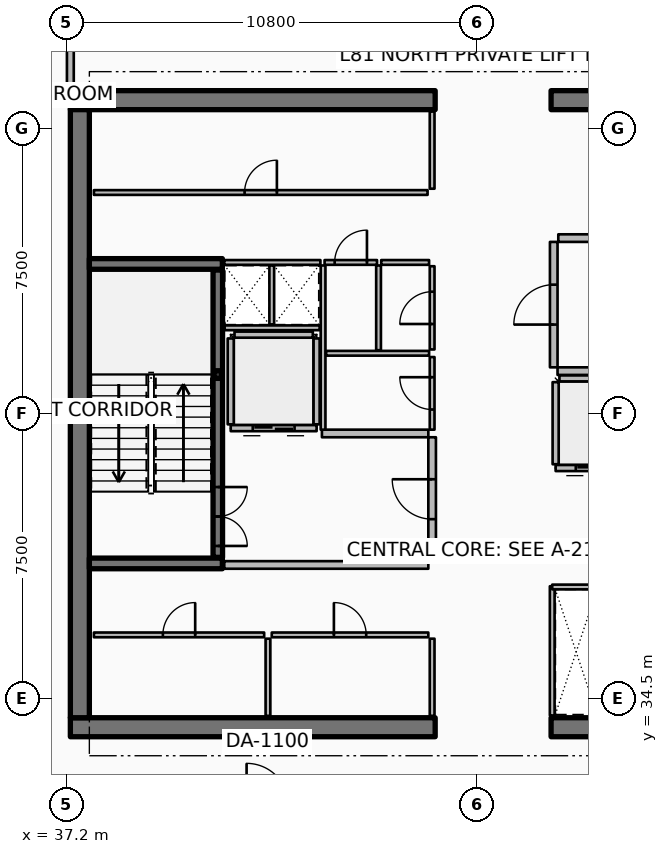
"""IFC4 building model, lengths in metres.
Left out: names, types, materials, properties, quantities, classifications, styles, units other than length and angle.
Written with IfcOpenShell. Run it as: python <this file> out.ifc"""

import sys

from ifc_helpers import new_model, si_unit, direction, frame, frame_2d, origin, origin_2d, place, context, subcontext, project, spatial, rectangle, hollow_rectangle, extrude, element, fill, save


model = new_model("IFC4")
c1 = context("Model", 3, precision=1e-05, world=origin(), true_north=direction((0.0, 1.0)))
c2 = subcontext(c1, "Body", "Model", "MODEL_VIEW")
j1 = project(units=[si_unit("LENGTHUNIT", "METRE"), si_unit("PLANEANGLEUNIT", "RADIAN")], contexts=[c1])
p1 = place(None, origin())
s1 = spatial("IfcSite", under=j1, at=p1, CompositionType="ELEMENT")
p2 = place(p1, origin())
s2 = spatial("IfcBuilding", under=s1, at=p2, CompositionType="ELEMENT")
p3 = place(p2, frame((0.0, 0.0, 322.1)))
s3 = spatial("IfcBuildingStorey", under=s2, at=p3, CompositionType="ELEMENT", Elevation=322.1)
p4 = place(p3, frame((37.3, 33.75, 0.0), z_axis=(0.0, 0.0, 1.0), x_axis=(1.0, 0.0, 0.0)))
e1 = element("IfcWall", 1, at=p4, inside=s3, PredefinedType="SHEAR", context=c2, shape_type="SweptSolid", body=[
    extrude(rectangle(XDim=9.6, YDim=0.5, at=frame_2d((4.8, 0.0))), origin(), (0.0, 0.0, 1.0), 4.2),
])
p5 = place(p3, frame((49.95, 33.75, 0.0), z_axis=(0.0, 0.0, 1.0), x_axis=(1.0, 0.0, 0.0)))
e2 = element("IfcWall", 2, at=p5, inside=s3, PredefinedType="SHEAR", context=c2, shape_type="SweptSolid", body=[
    extrude(rectangle(XDim=9.6, YDim=0.5, at=frame_2d((4.8, 0.0))), origin(), (0.0, 0.0, 1.0), 4.2),
])
p6 = place(p3, frame((37.3, 50.25, 0.0), z_axis=(0.0, 0.0, 1.0), x_axis=(1.0, 0.0, 0.0)))
e3 = element("IfcWall", 3, at=p6, inside=s3, PredefinedType="SHEAR", context=c2, shape_type="SweptSolid", body=[
    extrude(rectangle(XDim=9.6, YDim=0.5, at=frame_2d((4.8, 0.0))), origin(), (0.0, 0.0, 1.0), 4.2),
])
p7 = place(p3, frame((49.95, 50.25, 0.0), z_axis=(0.0, 0.0, 1.0), x_axis=(1.0, 0.0, 0.0)))
e4 = element("IfcWall", 4, at=p7, inside=s3, PredefinedType="SHEAR", context=c2, shape_type="SweptSolid", body=[
    extrude(rectangle(XDim=9.6, YDim=0.5, at=frame_2d((4.8, 0.0))), origin(), (0.0, 0.0, 1.0), 4.2),
])
p8 = place(p3, frame((37.55, 34.0, 0.0), z_axis=(0.0, 0.0, 1.0), x_axis=(0.0, 1.0, 0.0)))
e5 = element("IfcWall", 5, at=p8, inside=s3, PredefinedType="SHEAR", context=c2, shape_type="SweptSolid", body=[
    extrude(rectangle(XDim=16.0, YDim=0.5, at=frame_2d((8.0, 0.0))), origin(), (0.0, 0.0, 1.0), 4.2),
])
for number, where, z_axis, x_axis in (
    (6, (37.8, 38.06, 0.0), (0.0, 0.0, 1.0), (1.0, 0.0, 0.0)),
    (7, (37.8, 45.94, 0.0), (0.0, 0.0, 1.0), (1.0, 0.0, 0.0)),
):
    element("IfcWall", number, at=place(p3, frame(where, z_axis=z_axis, x_axis=x_axis)), inside=s3, PredefinedType="SHEAR", context=c2, shape_type="SweptSolid", body=[
        extrude(rectangle(XDim=3.5, YDim=0.28, at=frame_2d((1.75, 0.0))), origin(), (0.0, 0.0, 1.0), 4.2),
    ])
p9 = place(p3, frame((41.18, 43.03, 0.0), z_axis=(0.0, 0.0, 1.0), x_axis=(1.0, 0.0, 0.0)))
e8 = element("IfcColumn", 8, at=p9, inside=s3, PredefinedType="COLUMN", context=c2, shape_type="SweptSolid", body=[
    extrude(hollow_rectangle(XDim=0.2, YDim=0.2, WallThickness=0.01, InnerFilletRadius=0.01, OuterFilletRadius=0.02, at=origin_2d()), origin(), (0.0, 0.0, 1.0), 1.895),
])
p10 = place(p3, frame((41.18, 38.22, 0.0), z_axis=(0.0, 0.0, 1.0), x_axis=(0.0, 1.0, 0.0)))
e9 = element("IfcWall", 9, at=p10, inside=s3, PredefinedType="SOLIDWALL", context=c2, shape_type="SweptSolid", body=[
    extrude(rectangle(XDim=7.56, YDim=0.25, at=frame_2d((3.78, 0.0))), origin(), (0.0, 0.0, 1.0), 3.94),
])
p11 = place(p10, frame((0.3, 0.0, 0.0)))
e10 = element("IfcOpeningElement", 10, at=p11, cuts=e9, PredefinedType="OPENING", context=c2, shape_type="SweptSolid", body=[
    extrude(rectangle(XDim=1.55, YDim=2.15, at=frame_2d((0.775, 1.075))), frame((0.0, 0.135, 0.0), z_axis=(0.0, -1.0, 0.0), x_axis=(1.0, 0.0, 0.0)), (0.0, 0.0, 1.0), 0.27),
])
p12 = place(p3, frame((43.78, 41.62, 0.0), z_axis=(0.0, 0.0, 1.0), x_axis=(-1.0, 0.0, 0.0)))
e11 = element("IfcWall", 11, at=p12, inside=s3, PredefinedType="PARTITIONING", context=c2, shape_type="SweptSolid", body=[
    extrude(rectangle(XDim=2.26, YDim=0.16, at=frame_2d((1.13, 0.0))), origin(), (0.0, 0.0, 1.0), 3.94),
])
p13 = place(p12, frame((0.58, 0.0, 0.0)))
e12 = element("IfcOpeningElement", 12, at=p13, cuts=e11, PredefinedType="OPENING", context=c2, shape_type="SweptSolid", body=[
    extrude(rectangle(XDim=1.1, YDim=2.1, at=frame_2d((0.55, 1.05))), frame((0.0, 0.09, 0.0), z_axis=(0.0, -1.0, 0.0), x_axis=(1.0, 0.0, 0.0)), (0.0, 0.0, 1.0), 0.18),
])
for number, where, z_axis, x_axis in (
    (13, (43.78, 41.72, 0.0), (0.0, 0.0, 1.0), (0.0, 1.0, 0.0)),
    (14, (41.52, 41.72, 0.0), (0.0, 0.0, 1.0), (0.0, 1.0, 0.0)),
):
    element("IfcWall", number, at=place(p3, frame(where, z_axis=z_axis, x_axis=x_axis)), inside=s3, PredefinedType="PARTITIONING", context=c2, shape_type="SweptSolid", body=[
        extrude(rectangle(XDim=2.26, YDim=0.16, at=frame_2d((1.13, 0.0))), origin(), (0.0, 0.0, 1.0), 3.94),
    ])
p14 = place(p3, frame((41.62, 44.08, 0.0), z_axis=(0.0, 0.0, 1.0), x_axis=(1.0, 0.0, 0.0)))
e15 = element("IfcWall", 15, at=p14, inside=s3, PredefinedType="PARTITIONING", context=c2, shape_type="SweptSolid", body=[
    extrude(rectangle(XDim=2.06, YDim=0.16, at=frame_2d((1.03, 0.0))), origin(), (0.0, 0.0, 1.0), 3.94),
])
p15 = place(p3, frame((52.23, 40.57, 0.0), z_axis=(0.0, 0.0, 1.0), x_axis=(-1.0, 0.0, 0.0)))
e16 = element("IfcWall", 16, at=p15, inside=s3, PredefinedType="PARTITIONING", context=c2, shape_type="SweptSolid", body=[
    extrude(rectangle(XDim=2.16, YDim=0.16, at=frame_2d((1.08, 0.0))), origin(), (0.0, 0.0, 1.0), 3.94),
])
p16 = place(p15, frame((0.53, 0.0, 0.0)))
e17 = element("IfcOpeningElement", 17, at=p16, cuts=e16, PredefinedType="OPENING", context=c2, shape_type="SweptSolid", body=[
    extrude(rectangle(XDim=1.1, YDim=2.1, at=frame_2d((0.55, 1.05))), frame((0.0, 0.09, 0.0), z_axis=(0.0, -1.0, 0.0), x_axis=(1.0, 0.0, 0.0)), (0.0, 0.0, 1.0), 0.18),
])
p17 = place(p3, frame((50.07, 40.67, 0.0), z_axis=(0.0, 0.0, 1.0), x_axis=(0.0, 1.0, 0.0)))
e18 = element("IfcWall", 18, at=p17, inside=s3, PredefinedType="PARTITIONING", context=c2, shape_type="SweptSolid", body=[
    extrude(rectangle(XDim=2.16, YDim=0.16, at=frame_2d((1.08, 0.0))), origin(), (0.0, 0.0, 1.0), 3.94),
])
p18 = place(p3, frame((50.17, 42.93, 0.0), z_axis=(0.0, 0.0, 1.0), x_axis=(1.0, 0.0, 0.0)))
e19 = element("IfcWall", 19, at=p18, inside=s3, PredefinedType="PARTITIONING", context=c2, shape_type="SweptSolid", body=[
    extrude(rectangle(XDim=1.96, YDim=0.16, at=frame_2d((0.98, 0.0))), origin(), (0.0, 0.0, 1.0), 3.94),
])
for number, where, z_axis, x_axis in (
    (20, (46.82, 34.05, 0.0), (0.0, 0.0, 1.0), (0.0, 1.0, 0.0)),
    (21, (42.5, 34.05, 0.0), (0.0, 0.0, 1.0), (0.0, 1.0, 0.0)),
):
    element("IfcWall", number, at=place(p3, frame(where, z_axis=z_axis, x_axis=x_axis)), inside=s3, PredefinedType="PARTITIONING", context=c2, shape_type="SweptSolid", body=[
        extrude(rectangle(XDim=2.03, YDim=0.125, at=frame_2d((1.015, 0.0))), origin(), (0.0, 0.0, 1.0), 3.38),
    ])
p19 = place(p3, frame((37.92, 36.18, 0.0), z_axis=(0.0, 0.0, 1.0), x_axis=(1.0, 0.0, 0.0)))
e22 = element("IfcWall", 22, at=p19, inside=s3, PredefinedType="PARTITIONING", context=c2, shape_type="SweptSolid", body=[
    extrude(rectangle(XDim=4.48, YDim=0.125, at=frame_2d((2.24, 0.0))), origin(), (0.0, 0.0, 1.0), 3.38),
])
p20 = place(p19, frame((1.815, 0.0, 0.0)))
e23 = element("IfcOpeningElement", 23, at=p20, cuts=e22, PredefinedType="OPENING", context=c2, shape_type="SweptSolid", body=[
    extrude(rectangle(XDim=0.85, YDim=2.06, at=frame_2d((0.425, 1.03))), frame((0.0, 0.073, 0.0), z_axis=(0.0, -1.0, 0.0), x_axis=(1.0, 0.0, 0.0)), (0.0, 0.0, 1.0), 0.145),
])
p21 = place(p3, frame((42.6, 36.18, 0.0), z_axis=(0.0, 0.0, 1.0), x_axis=(1.0, 0.0, 0.0)))
e24 = element("IfcWall", 24, at=p21, inside=s3, PredefinedType="PARTITIONING", context=c2, shape_type="SweptSolid", body=[
    extrude(rectangle(XDim=4.12, YDim=0.125, at=frame_2d((2.06, 0.0))), origin(), (0.0, 0.0, 1.0), 3.38),
])
p22 = place(p21, frame((1.635, 0.0, 0.0)))
e25 = element("IfcOpeningElement", 25, at=p22, cuts=e24, PredefinedType="OPENING", context=c2, shape_type="SweptSolid", body=[
    extrude(rectangle(XDim=0.85, YDim=2.06, at=frame_2d((0.425, 1.03))), frame((0.0, 0.073, 0.0), z_axis=(0.0, -1.0, 0.0), x_axis=(1.0, 0.0, 0.0)), (0.0, 0.0, 1.0), 0.145),
])
p23 = place(p3, frame((46.82, 47.92, 0.0), z_axis=(0.0, 0.0, 1.0), x_axis=(0.0, 1.0, 0.0)))
e26 = element("IfcWall", 26, at=p23, inside=s3, PredefinedType="PARTITIONING", context=c2, shape_type="SweptSolid", body=[
    extrude(rectangle(XDim=2.03, YDim=0.125, at=frame_2d((1.015, 0.0))), origin(), (0.0, 0.0, 1.0), 3.38),
])
p24 = place(p3, frame((37.92, 47.82, 0.0), z_axis=(0.0, 0.0, 1.0), x_axis=(1.0, 0.0, 0.0)))
e27 = element("IfcWall", 27, at=p24, inside=s3, PredefinedType="PARTITIONING", context=c2, shape_type="SweptSolid", body=[
    extrude(rectangle(XDim=8.78, YDim=0.125, at=frame_2d((4.39, 0.0))), origin(), (0.0, 0.0, 1.0), 3.38),
])
p25 = place(p24, frame((3.965, 0.0, 0.0)))
e28 = element("IfcOpeningElement", 28, at=p25, cuts=e27, PredefinedType="OPENING", context=c2, shape_type="SweptSolid", body=[
    extrude(rectangle(XDim=0.85, YDim=2.06, at=frame_2d((0.425, 1.03))), frame((0.0, 0.073, 0.0), z_axis=(0.0, -1.0, 0.0), x_axis=(1.0, 0.0, 0.0)), (0.0, 0.0, 1.0), 0.145),
])
p26 = place(p3, frame((41.35, 38.02, 0.0), z_axis=(0.0, 0.0, 1.0), x_axis=(1.0, 0.0, 0.0)))
e29 = element("IfcWall", 29, at=p26, inside=s3, PredefinedType="PARTITIONING", context=c2, shape_type="SweptSolid", body=[
    extrude(rectangle(XDim=5.37, YDim=0.2, at=frame_2d((2.685, 0.0))), origin(), (0.0, 0.0, 1.0), 3.94),
])
p27 = place(p3, frame((43.92, 41.48, 0.0), z_axis=(0.0, 0.0, 1.0), x_axis=(1.0, 0.0, 0.0)))
e30 = element("IfcWall", 30, at=p27, inside=s3, PredefinedType="PARTITIONING", context=c2, shape_type="SweptSolid", body=[
    extrude(rectangle(XDim=2.8, YDim=0.2, at=frame_2d((1.4, 0.0))), origin(), (0.0, 0.0, 1.0), 3.94),
])
p28 = place(p3, frame((46.82, 38.12, 0.0), z_axis=(0.0, 0.0, 1.0), x_axis=(0.0, 1.0, 0.0)))
e31 = element("IfcWall", 31, at=p28, inside=s3, PredefinedType="PARTITIONING", context=c2, shape_type="SweptSolid", body=[
    extrude(rectangle(XDim=3.26, YDim=0.2, at=frame_2d((1.63, 0.0))), origin(), (0.0, 0.0, 1.0), 3.94),
])
p29 = place(p28, frame((1.105, 0.0, 0.0)))
e32 = element("IfcOpeningElement", 32, at=p29, cuts=e31, PredefinedType="OPENING", context=c2, shape_type="SweptSolid", body=[
    extrude(rectangle(XDim=1.05, YDim=2.1, at=frame_2d((0.525, 1.05))), frame((0.0, 0.11, 0.0), z_axis=(0.0, -1.0, 0.0), x_axis=(1.0, 0.0, 0.0)), (0.0, 0.0, 1.0), 0.22),
])
p30 = place(p3, frame((50.12, 43.12, 0.0), z_axis=(0.0, 0.0, 1.0), x_axis=(1.0, 0.0, 0.0)))
e33 = element("IfcWall", 33, at=p30, inside=s3, PredefinedType="PARTITIONING", context=c2, shape_type="SweptSolid", body=[
    extrude(rectangle(XDim=8.88, YDim=0.2, at=frame_2d((4.44, 0.0))), origin(), (0.0, 0.0, 1.0), 3.94),
])
p31 = place(p3, frame((50.14, 46.62, 0.0), z_axis=(0.0, 0.0, 1.0), x_axis=(1.0, 0.0, 0.0)))
e34 = element("IfcWall", 34, at=p31, inside=s3, PredefinedType="PARTITIONING", context=c2, shape_type="SweptSolid", body=[
    extrude(rectangle(XDim=1.02, YDim=0.2, at=frame_2d((0.51, 0.0))), origin(), (0.0, 0.0, 1.0), 3.94),
])
p32 = place(p3, frame((50.02, 43.22, 0.0), z_axis=(0.0, 0.0, 1.0), x_axis=(0.0, 1.0, 0.0)))
e35 = element("IfcWall", 35, at=p32, inside=s3, PredefinedType="PARTITIONING", context=c2, shape_type="SweptSolid", body=[
    extrude(rectangle(XDim=3.3, YDim=0.2, at=frame_2d((1.65, 0.0))), origin(), (0.0, 0.0, 1.0), 3.94),
])
p33 = place(p32, frame((1.125, 0.0, 0.0)))
e36 = element("IfcOpeningElement", 36, at=p33, cuts=e35, PredefinedType="OPENING", context=c2, shape_type="SweptSolid", body=[
    extrude(rectangle(XDim=1.05, YDim=2.1, at=frame_2d((0.525, 1.05))), frame((0.0, 0.11, 0.0), z_axis=(0.0, -1.0, 0.0), x_axis=(1.0, 0.0, 0.0)), (0.0, 0.0, 1.0), 0.22),
])
p34 = place(p3, frame((41.36, 44.26, 0.0), z_axis=(0.0, 0.0, 1.0), x_axis=(1.0, 0.0, 0.0)))
e37 = element("IfcWall", 37, at=p34, inside=s3, PredefinedType="PARTITIONING", context=c2, shape_type="SweptSolid", body=[
    extrude(rectangle(XDim=2.5, YDim=0.125, at=frame_2d((1.25, 0.0))), origin(), (0.0, 0.0, 1.0), 3.38),
])
p35 = place(p3, frame((42.6, 44.35, 0.0), z_axis=(0.0, 0.0, 1.0), x_axis=(0.0, 1.0, 0.0)))
e38 = element("IfcWall", 38, at=p35, inside=s3, PredefinedType="PARTITIONING", context=c2, shape_type="SweptSolid", body=[
    extrude(rectangle(XDim=1.55, YDim=0.125, at=frame_2d((0.775, 0.0))), origin(), (0.0, 0.0, 1.0), 3.38),
])
p36 = place(p3, frame((49.98, 34.06, 0.0), z_axis=(0.0, 0.0, 1.0), x_axis=(0.0, 1.0, 0.0)))
e39 = element("IfcWall", 39, at=p36, inside=s3, PredefinedType="PARTITIONING", context=c2, shape_type="SweptSolid", body=[
    extrude(rectangle(XDim=3.4, YDim=0.125, at=frame_2d((1.7, 0.0))), origin(), (0.0, 0.0, 1.0), 3.38),
])
p37 = place(p3, frame((49.98, 37.44, 0.0), z_axis=(0.0, 0.0, 1.0), x_axis=(1.0, 0.0, 0.0)))
e40 = element("IfcWall", 40, at=p37, inside=s3, PredefinedType="PARTITIONING", context=c2, shape_type="SweptSolid", body=[
    extrude(rectangle(XDim=1.26, YDim=0.125, at=frame_2d((0.63, 0.0))), origin(), (0.0, 0.0, 1.0), 3.38),
])
p38 = place(p3, frame((43.95, 41.58, 0.0), z_axis=(0.0, 0.0, 1.0), x_axis=(0.0, 1.0, 0.0)))
e41 = element("IfcWall", 41, at=p38, inside=s3, PredefinedType="PARTITIONING", context=c2, shape_type="SweptSolid", body=[
    extrude(rectangle(XDim=4.32, YDim=0.125, at=frame_2d((2.16, 0.0))), origin(), (0.0, 0.0, 1.0), 3.38),
])
p39 = place(p3, frame((44.03, 43.59, 0.0), z_axis=(0.0, 0.0, 1.0), x_axis=(1.0, 0.0, 0.0)))
e42 = element("IfcWall", 42, at=p39, inside=s3, PredefinedType="PARTITIONING", context=c2, shape_type="SweptSolid", body=[
    extrude(rectangle(XDim=2.71, YDim=0.125, at=frame_2d((1.355, 0.0))), origin(), (0.0, 0.0, 1.0), 3.38),
])
p40 = place(p3, frame((45.41, 43.67, 0.0), z_axis=(0.0, 0.0, 1.0), x_axis=(0.0, 1.0, 0.0)))
e43 = element("IfcWall", 43, at=p40, inside=s3, PredefinedType="PARTITIONING", context=c2, shape_type="SweptSolid", body=[
    extrude(rectangle(XDim=2.23, YDim=0.125, at=frame_2d((1.115, 0.0))), origin(), (0.0, 0.0, 1.0), 3.38),
])
p41 = place(p3, frame((46.82, 41.58, 0.0), z_axis=(0.0, 0.0, 1.0), x_axis=(0.0, 1.0, 0.0)))
e44 = element("IfcWall", 44, at=p41, inside=s3, PredefinedType="PARTITIONING", context=c2, shape_type="SweptSolid", body=[
    extrude(rectangle(XDim=1.91, YDim=0.125, at=frame_2d((0.955, 0.0))), origin(), (0.0, 0.0, 1.0), 3.38),
])
p42 = place(p41, frame((0.53, 0.0, 0.0)))
e45 = element("IfcOpeningElement", 45, at=p42, cuts=e44, PredefinedType="OPENING", context=c2, shape_type="SweptSolid", body=[
    extrude(rectangle(XDim=0.85, YDim=2.06, at=frame_2d((0.425, 1.03))), frame((0.0, 0.073, 0.0), z_axis=(0.0, -1.0, 0.0), x_axis=(1.0, 0.0, 0.0)), (0.0, 0.0, 1.0), 0.145),
])
p43 = place(p3, frame((46.82, 43.69, 0.0), z_axis=(0.0, 0.0, 1.0), x_axis=(0.0, 1.0, 0.0)))
e46 = element("IfcWall", 46, at=p43, inside=s3, PredefinedType="PARTITIONING", context=c2, shape_type="SweptSolid", body=[
    extrude(rectangle(XDim=2.19, YDim=0.125, at=frame_2d((1.095, 0.0))), origin(), (0.0, 0.0, 1.0), 3.38),
])
p44 = place(p43, frame((0.67, 0.0, 0.0)))
e47 = element("IfcOpeningElement", 47, at=p44, cuts=e46, PredefinedType="OPENING", context=c2, shape_type="SweptSolid", body=[
    extrude(rectangle(XDim=0.85, YDim=2.06, at=frame_2d((0.425, 1.03))), frame((0.0, 0.073, 0.0), z_axis=(0.0, -1.0, 0.0), x_axis=(1.0, 0.0, 0.0)), (0.0, 0.0, 1.0), 0.145),
])
p45 = place(p3, frame((41.35, 45.98, 0.0), z_axis=(0.0, 0.0, 1.0), x_axis=(1.0, 0.0, 0.0)))
e48 = element("IfcWall", 48, at=p45, inside=s3, PredefinedType="PARTITIONING", context=c2, shape_type="SweptSolid", body=[
    extrude(rectangle(XDim=2.53, YDim=0.125, at=frame_2d((1.265, 0.0))), origin(), (0.0, 0.0, 1.0), 3.38),
])
p46 = place(p3, frame((43.99, 45.98, 0.0), z_axis=(0.0, 0.0, 1.0), x_axis=(1.0, 0.0, 0.0)))
e49 = element("IfcWall", 49, at=p46, inside=s3, PredefinedType="PARTITIONING", context=c2, shape_type="SweptSolid", body=[
    extrude(rectangle(XDim=1.38, YDim=0.125, at=frame_2d((0.69, 0.0))), origin(), (0.0, 0.0, 1.0), 3.38),
])
p47 = place(p46, frame((0.265, 0.0, 0.0)))
e50 = element("IfcOpeningElement", 50, at=p47, cuts=e49, PredefinedType="OPENING", context=c2, shape_type="SweptSolid", body=[
    extrude(rectangle(XDim=0.85, YDim=2.06, at=frame_2d((0.425, 1.03))), frame((0.0, 0.073, 0.0), z_axis=(0.0, -1.0, 0.0), x_axis=(1.0, 0.0, 0.0)), (0.0, 0.0, 1.0), 0.145),
])
p48 = place(p3, frame((45.48, 45.98, 0.0), z_axis=(0.0, 0.0, 1.0), x_axis=(1.0, 0.0, 0.0)))
e51 = element("IfcWall", 51, at=p48, inside=s3, PredefinedType="PARTITIONING", context=c2, shape_type="SweptSolid", body=[
    extrude(rectangle(XDim=1.26, YDim=0.125, at=frame_2d((0.63, 0.0))), origin(), (0.0, 0.0, 1.0), 3.38),
])
p49 = place(p3, frame((37.3, 52.18, 0.0), z_axis=(0.0, 0.0, 1.0), x_axis=(0.0, -1.0, 0.0)))
e52 = element("IfcWall", 52, at=p49, inside=s3, PredefinedType="PARTITIONING", context=c2, shape_type="SweptSolid", body=[
    extrude(rectangle(XDim=1.625, YDim=0.18, at=frame_2d((0.812, 0.0))), origin(), (0.0, 0.0, 1.0), 3.38),
])
p50 = place(p11, origin())
e53 = element("IfcDoor", 53, at=p50, inside=s3, OperationType="DOUBLE_DOOR_SINGLE_SWING", PredefinedType="DOOR", context=c2, shape_type="SweptSolid", body=[
    extrude(rectangle(XDim=1.55, YDim=2.15, at=frame_2d((0.775, 1.075))), frame((0.0, 0.025, 0.0), z_axis=(0.0, -1.0, 0.0), x_axis=(1.0, 0.0, 0.0)), (0.0, 0.0, 1.0), 0.05),
])
fill(e10, e53)
p51 = place(p13, origin())
e54 = element("IfcDoor", 54, at=p51, inside=s3, OperationType="DOUBLE_DOOR_SLIDING", PredefinedType="DOOR", context=c2, shape_type="SweptSolid", body=[
    extrude(rectangle(XDim=1.1, YDim=2.1, at=frame_2d((0.55, 1.05))), frame((0.0, 0.025, 0.0), z_axis=(0.0, -1.0, 0.0), x_axis=(1.0, 0.0, 0.0)), (0.0, 0.0, 1.0), 0.05),
])
fill(e12, e54)
p52 = place(p16, origin())
e55 = element("IfcDoor", 55, at=p52, inside=s3, OperationType="DOUBLE_DOOR_SLIDING", PredefinedType="DOOR", context=c2, shape_type="SweptSolid", body=[
    extrude(rectangle(XDim=1.1, YDim=2.1, at=frame_2d((0.55, 1.05))), frame((0.0, 0.025, 0.0), z_axis=(0.0, -1.0, 0.0), x_axis=(1.0, 0.0, 0.0)), (0.0, 0.0, 1.0), 0.05),
])
fill(e17, e55)
p53 = place(p20, origin())
e56 = element("IfcDoor", 56, at=p53, inside=s3, OperationType="SINGLE_SWING_RIGHT", PredefinedType="DOOR", context=c2, shape_type="SweptSolid", body=[
    extrude(rectangle(XDim=0.85, YDim=2.06, at=frame_2d((0.425, 1.03))), frame((0.0, 0.025, 0.0), z_axis=(0.0, -1.0, 0.0), x_axis=(1.0, 0.0, 0.0)), (0.0, 0.0, 1.0), 0.05),
])
fill(e23, e56)
p54 = place(p22, origin())
e57 = element("IfcDoor", 57, at=p54, inside=s3, OperationType="SINGLE_SWING_LEFT", PredefinedType="DOOR", context=c2, shape_type="SweptSolid", body=[
    extrude(rectangle(XDim=0.85, YDim=2.06, at=frame_2d((0.425, 1.03))), frame((0.0, 0.025, 0.0), z_axis=(0.0, -1.0, 0.0), x_axis=(1.0, 0.0, 0.0)), (0.0, 0.0, 1.0), 0.05),
])
fill(e25, e57)
p55 = place(p25, origin())
e58 = element("IfcDoor", 58, at=p55, inside=s3, OperationType="SINGLE_SWING_RIGHT", PredefinedType="DOOR", context=c2, shape_type="SweptSolid", body=[
    extrude(rectangle(XDim=0.85, YDim=2.06, at=frame_2d((0.425, 1.03))), frame((0.0, 0.025, 0.0), z_axis=(0.0, -1.0, 0.0), x_axis=(1.0, 0.0, 0.0)), (0.0, 0.0, 1.0), 0.05),
])
fill(e28, e58)
p56 = place(p29, origin())
e59 = element("IfcDoor", 59, at=p56, inside=s3, OperationType="SINGLE_SWING_RIGHT", PredefinedType="DOOR", context=c2, shape_type="SweptSolid", body=[
    extrude(rectangle(XDim=1.05, YDim=2.1, at=frame_2d((0.525, 1.05))), frame((0.0, 0.025, 0.0), z_axis=(0.0, -1.0, 0.0), x_axis=(1.0, 0.0, 0.0)), (0.0, 0.0, 1.0), 0.05),
])
fill(e32, e59)
p57 = place(p33, origin())
e60 = element("IfcDoor", 60, at=p57, inside=s3, OperationType="SINGLE_SWING_LEFT", PredefinedType="DOOR", context=c2, shape_type="SweptSolid", body=[
    extrude(rectangle(XDim=1.05, YDim=2.1, at=frame_2d((0.525, 1.05))), frame((0.0, 0.025, 0.0), z_axis=(0.0, -1.0, 0.0), x_axis=(1.0, 0.0, 0.0)), (0.0, 0.0, 1.0), 0.05),
])
fill(e36, e60)
p58 = place(p42, origin())
e61 = element("IfcDoor", 61, at=p58, inside=s3, OperationType="SINGLE_SWING_RIGHT", PredefinedType="DOOR", context=c2, shape_type="SweptSolid", body=[
    extrude(rectangle(XDim=0.85, YDim=2.06, at=frame_2d((0.425, 1.03))), frame((0.0, 0.025, 0.0), z_axis=(0.0, -1.0, 0.0), x_axis=(1.0, 0.0, 0.0)), (0.0, 0.0, 1.0), 0.05),
])
fill(e45, e61)
p59 = place(p44, origin())
e62 = element("IfcDoor", 62, at=p59, inside=s3, OperationType="SINGLE_SWING_LEFT", PredefinedType="DOOR", context=c2, shape_type="SweptSolid", body=[
    extrude(rectangle(XDim=0.85, YDim=2.06, at=frame_2d((0.425, 1.03))), frame((0.0, 0.025, 0.0), z_axis=(0.0, -1.0, 0.0), x_axis=(1.0, 0.0, 0.0)), (0.0, 0.0, 1.0), 0.05),
])
fill(e47, e62)
p60 = place(p47, origin())
e63 = element("IfcDoor", 63, at=p60, inside=s3, OperationType="SINGLE_SWING_RIGHT", PredefinedType="DOOR", context=c2, shape_type="SweptSolid", body=[
    extrude(rectangle(XDim=0.85, YDim=2.06, at=frame_2d((0.425, 1.03))), frame((0.0, 0.025, 0.0), z_axis=(0.0, -1.0, 0.0), x_axis=(1.0, 0.0, 0.0)), (0.0, 0.0, 1.0), 0.05),
])
fill(e50, e63)
save(model, sys.argv[1])
